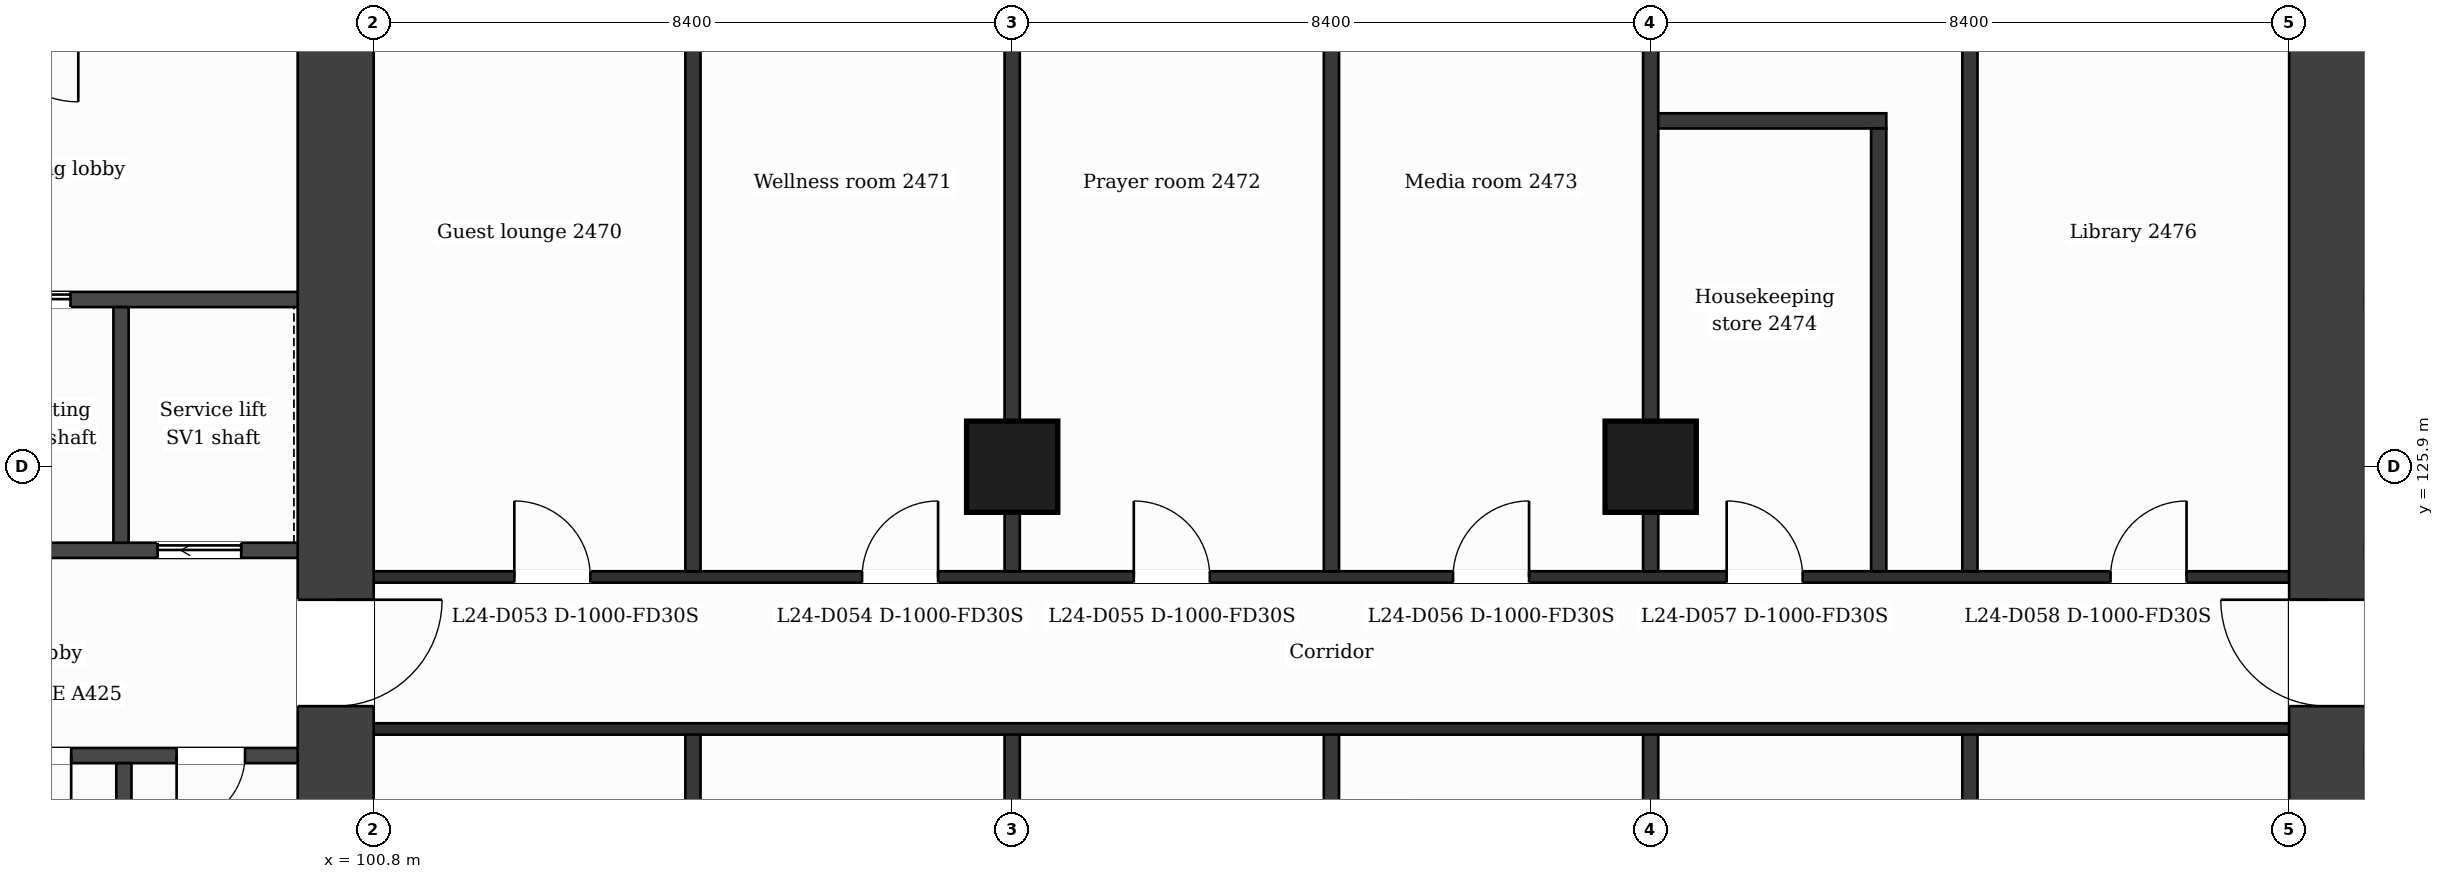
"""IFC4 building model, lengths in metres.
Left out: names, types, materials, properties, quantities, classifications, styles, units other than length and angle.
Written with IfcOpenShell. Run it as: python <this file> out.ifc"""

import sys

from ifc_helpers import new_model, si_unit, direction, frame, frame_2d, origin, origin_2d, place, context, subcontext, project, spatial, rectangle, extrude, element, fill, save


model = new_model("IFC4")
c1 = context("Model", 3, precision=1e-05, world=origin(), true_north=direction((0.0, 1.0)))
c2 = subcontext(c1, "Body", "Model", "MODEL_VIEW")
j1 = project(units=[si_unit("LENGTHUNIT", "METRE"), si_unit("PLANEANGLEUNIT", "RADIAN")], contexts=[c1])
p1 = place(None, origin())
s1 = spatial("IfcSite", under=j1, at=p1, CompositionType="ELEMENT")
p2 = place(p1, origin())
s2 = spatial("IfcBuilding", under=s1, at=p2, CompositionType="ELEMENT")
p3 = place(p2, frame((0.0, 0.0, 105.8)))
s3 = spatial("IfcBuildingStorey", under=s2, at=p3, CompositionType="ELEMENT", Elevation=105.8)
p4 = place(p3, frame((100.3, 131.9, 0.0), z_axis=(0.0, 0.0, 1.0), x_axis=(0.0, -1.0, 0.0)))
e1 = element("IfcWall", 1, at=p4, inside=s3, PredefinedType="SHEAR", context=c2, shape_type="SweptSolid", body=[
    extrude(rectangle(XDim=21.0, YDim=1.0, at=frame_2d((10.5, 0.0))), origin(), (0.0, 0.0, 1.0), 3.7),
])
p5 = place(p4, frame((7.75, 0.0, 0.0)))
e2 = element("IfcOpeningElement", 2, at=p5, cuts=e1, PredefinedType="OPENING", context=c2, shape_type="SweptSolid", body=[
    extrude(rectangle(XDim=1.4, YDim=2.1, at=frame_2d((0.7, 1.05))), frame((0.0, 0.51, 0.0), z_axis=(0.0, -1.0, 0.0), x_axis=(1.0, 0.0, 0.0)), (0.0, 0.0, 1.0), 1.02),
])
p6 = place(p3, frame((126.5, 110.9, 0.0), z_axis=(0.0, 0.0, 1.0), x_axis=(0.0, 1.0, 0.0)))
e3 = element("IfcWall", 3, at=p6, inside=s3, PredefinedType="SHEAR", context=c2, shape_type="SweptSolid", body=[
    extrude(rectangle(XDim=21.0, YDim=1.0, at=frame_2d((10.5, 0.0))), origin(), (0.0, 0.0, 1.0), 3.7),
])
p7 = place(p6, frame((11.85, 0.0, 0.0)))
e4 = element("IfcOpeningElement", 4, at=p7, cuts=e3, PredefinedType="OPENING", context=c2, shape_type="SweptSolid", body=[
    extrude(rectangle(XDim=1.4, YDim=2.1, at=frame_2d((0.7, 1.05))), frame((0.0, 0.51, 0.0), z_axis=(0.0, -1.0, 0.0), x_axis=(1.0, 0.0, 0.0)), (0.0, 0.0, 1.0), 1.02),
])
for number, where, z_axis, x_axis in (
    (5, (109.2, 125.9, 0.0), (0.0, 0.0, 1.0), (1.0, 0.0, 0.0)),
    (6, (117.6, 125.9, 0.0), (0.0, 0.0, 1.0), (1.0, 0.0, 0.0)),
):
    element("IfcColumn", number, at=place(p3, frame(where, z_axis=z_axis, x_axis=x_axis)), inside=s3, PredefinedType="COLUMN", context=c2, shape_type="SweptSolid", body=[
        extrude(rectangle(XDim=1.2, YDim=1.2, at=origin_2d()), origin(), (0.0, 0.0, 1.0), 3.7),
    ])
p8 = place(p3, frame((95.227, 122.1, 0.0), z_axis=(0.0, 0.0, 1.0), x_axis=(1.0, 0.0, 0.0)))
e7 = element("IfcWall", 7, at=p8, inside=s3, PredefinedType="PARTITIONING", context=c2, shape_type="SweptSolid", body=[
    extrude(rectangle(XDim=4.573, YDim=0.2, at=frame_2d((2.287, 0.0))), origin(), (0.0, 0.0, 1.0), 3.38),
])
p9 = place(p8, frame((0.693, 0.0, 0.0)))
e8 = element("IfcOpeningElement", 8, at=p9, cuts=e7, PredefinedType="OPENING", context=c2, shape_type="SweptSolid", body=[
    extrude(rectangle(XDim=0.9, YDim=2.1, at=frame_2d((0.45, 1.05))), frame((0.0, 0.11, 0.0), z_axis=(0.0, -1.0, 0.0), x_axis=(1.0, 0.0, 0.0)), (0.0, 0.0, 1.0), 0.22),
])
p10 = place(p8, frame((2.98, 0.0, 0.0)))
e9 = element("IfcOpeningElement", 9, at=p10, cuts=e7, PredefinedType="OPENING", context=c2, shape_type="SweptSolid", body=[
    extrude(rectangle(XDim=0.9, YDim=2.1, at=frame_2d((0.45, 1.05))), frame((0.0, 0.11, 0.0), z_axis=(0.0, -1.0, 0.0), x_axis=(1.0, 0.0, 0.0)), (0.0, 0.0, 1.0), 0.22),
])
p11 = place(p3, frame((100.8, 122.45, 0.0), z_axis=(0.0, 0.0, 1.0), x_axis=(1.0, 0.0, 0.0)))
e10 = element("IfcWall", 10, at=p11, inside=s3, PredefinedType="PARTITIONING", context=c2, shape_type="SweptSolid", body=[
    extrude(rectangle(XDim=25.2, YDim=0.15, at=frame_2d((12.6, 0.0))), origin(), (0.0, 0.0, 1.0), 3.38),
])
p12 = place(p3, frame((100.8, 124.45, 0.0), z_axis=(0.0, 0.0, 1.0), x_axis=(1.0, 0.0, 0.0)))
e11 = element("IfcWall", 11, at=p12, inside=s3, PredefinedType="PARTITIONING", context=c2, shape_type="SweptSolid", body=[
    extrude(rectangle(XDim=25.2, YDim=0.15, at=frame_2d((12.6, 0.0))), origin(), (0.0, 0.0, 1.0), 3.38),
])
p13 = place(p12, frame((1.85, 0.0, 0.0)))
e12 = element("IfcOpeningElement", 12, at=p13, cuts=e11, PredefinedType="OPENING", context=c2, shape_type="SweptSolid", body=[
    extrude(rectangle(XDim=1.0, YDim=2.1, at=frame_2d((0.5, 1.05))), frame((0.0, 0.085, 0.0), z_axis=(0.0, -1.0, 0.0), x_axis=(1.0, 0.0, 0.0)), (0.0, 0.0, 1.0), 0.17),
])
p14 = place(p12, frame((6.425, 0.0, 0.0)))
e13 = element("IfcOpeningElement", 13, at=p14, cuts=e11, PredefinedType="OPENING", context=c2, shape_type="SweptSolid", body=[
    extrude(rectangle(XDim=1.0, YDim=2.1, at=frame_2d((0.5, 1.05))), frame((0.0, 0.085, 0.0), z_axis=(0.0, -1.0, 0.0), x_axis=(1.0, 0.0, 0.0)), (0.0, 0.0, 1.0), 0.17),
])
p15 = place(p12, frame((10.0, 0.0, 0.0)))
e14 = element("IfcOpeningElement", 14, at=p15, cuts=e11, PredefinedType="OPENING", context=c2, shape_type="SweptSolid", body=[
    extrude(rectangle(XDim=1.0, YDim=2.1, at=frame_2d((0.5, 1.05))), frame((0.0, 0.085, 0.0), z_axis=(0.0, -1.0, 0.0), x_axis=(1.0, 0.0, 0.0)), (0.0, 0.0, 1.0), 0.17),
])
p16 = place(p12, frame((14.2, 0.0, 0.0)))
e15 = element("IfcOpeningElement", 15, at=p16, cuts=e11, PredefinedType="OPENING", context=c2, shape_type="SweptSolid", body=[
    extrude(rectangle(XDim=1.0, YDim=2.1, at=frame_2d((0.5, 1.05))), frame((0.0, 0.085, 0.0), z_axis=(0.0, -1.0, 0.0), x_axis=(1.0, 0.0, 0.0)), (0.0, 0.0, 1.0), 0.17),
])
p17 = place(p12, frame((17.8, 0.0, 0.0)))
e16 = element("IfcOpeningElement", 16, at=p17, cuts=e11, PredefinedType="OPENING", context=c2, shape_type="SweptSolid", body=[
    extrude(rectangle(XDim=1.0, YDim=2.1, at=frame_2d((0.5, 1.05))), frame((0.0, 0.085, 0.0), z_axis=(0.0, -1.0, 0.0), x_axis=(1.0, 0.0, 0.0)), (0.0, 0.0, 1.0), 0.17),
])
p18 = place(p12, frame((22.85, 0.0, 0.0)))
e17 = element("IfcOpeningElement", 17, at=p18, cuts=e11, PredefinedType="OPENING", context=c2, shape_type="SweptSolid", body=[
    extrude(rectangle(XDim=1.0, YDim=2.1, at=frame_2d((0.5, 1.05))), frame((0.0, 0.085, 0.0), z_axis=(0.0, -1.0, 0.0), x_axis=(1.0, 0.0, 0.0)), (0.0, 0.0, 1.0), 0.17),
])
p19 = place(p3, frame((92.702, 124.8, 0.0), z_axis=(0.0, 0.0, 1.0), x_axis=(1.0, 0.0, 0.0)))
e18 = element("IfcWall", 18, at=p19, inside=s3, PredefinedType="PARTITIONING", context=c2, shape_type="SweptSolid", body=[
    extrude(rectangle(XDim=7.098, YDim=0.2, at=frame_2d((3.549, 0.0))), origin(), (0.0, 0.0, 1.0), 3.38),
])
p20 = place(p19, frame((5.255, 0.0, 0.0)))
e19 = element("IfcOpeningElement", 19, at=p20, cuts=e18, PredefinedType="OPENING", context=c2, shape_type="SweptSolid", body=[
    extrude(rectangle(XDim=1.1, YDim=2.1, at=frame_2d((0.55, 1.05))), frame((0.0, 0.11, 0.0), z_axis=(0.0, -1.0, 0.0), x_axis=(1.0, 0.0, 0.0)), (0.0, 0.0, 1.0), 0.22),
])
p21 = place(p3, frame((127.0, 124.8, 0.0), z_axis=(0.0, 0.0, 1.0), x_axis=(1.0, 0.0, 0.0)))
e20 = element("IfcWall", 20, at=p21, inside=s3, PredefinedType="PARTITIONING", context=c2, shape_type="SweptSolid", body=[
    extrude(rectangle(XDim=4.649, YDim=0.2, at=frame_2d((2.324, 0.0))), origin(), (0.0, 0.0, 1.0), 3.38),
])
p22 = place(p21, frame((0.743, 0.0, 0.0)))
e21 = element("IfcOpeningElement", 21, at=p22, cuts=e20, PredefinedType="OPENING", context=c2, shape_type="SweptSolid", body=[
    extrude(rectangle(XDim=1.1, YDim=2.1, at=frame_2d((0.55, 1.05))), frame((0.0, 0.11, 0.0), z_axis=(0.0, -1.0, 0.0), x_axis=(1.0, 0.0, 0.0)), (0.0, 0.0, 1.0), 0.22),
])
p23 = place(p3, frame((92.827, 128.1, 0.0), z_axis=(0.0, 0.0, 1.0), x_axis=(1.0, 0.0, 0.0)))
e22 = element("IfcWall", 22, at=p23, inside=s3, PredefinedType="PARTITIONING", context=c2, shape_type="SweptSolid", body=[
    extrude(rectangle(XDim=6.973, YDim=0.2, at=frame_2d((3.487, 0.0))), origin(), (0.0, 0.0, 1.0), 3.38),
])
p24 = place(p23, frame((2.884, 0.0, 0.0)))
e23 = element("IfcOpeningElement", 23, at=p24, cuts=e22, PredefinedType="OPENING", context=c2, shape_type="SweptSolid", body=[
    extrude(rectangle(XDim=1.1, YDim=2.1, at=frame_2d((0.55, 1.05))), frame((0.0, 0.11, 0.0), z_axis=(0.0, -1.0, 0.0), x_axis=(1.0, 0.0, 0.0)), (0.0, 0.0, 1.0), 0.22),
])
p25 = place(p3, frame((127.0, 128.1, 0.0), z_axis=(0.0, 0.0, 1.0), x_axis=(1.0, 0.0, 0.0)))
e24 = element("IfcWall", 24, at=p25, inside=s3, PredefinedType="PARTITIONING", context=c2, shape_type="SweptSolid", body=[
    extrude(rectangle(XDim=4.649, YDim=0.2, at=frame_2d((2.324, 0.0))), origin(), (0.0, 0.0, 1.0), 3.38),
])
p26 = place(p25, frame((2.805, 0.0, 0.0)))
e25 = element("IfcOpeningElement", 25, at=p26, cuts=e24, PredefinedType="OPENING", context=c2, shape_type="SweptSolid", body=[
    extrude(rectangle(XDim=1.1, YDim=2.1, at=frame_2d((0.55, 1.05))), frame((0.0, 0.11, 0.0), z_axis=(0.0, -1.0, 0.0), x_axis=(1.0, 0.0, 0.0)), (0.0, 0.0, 1.0), 0.22),
])
p27 = place(p3, frame((117.6, 130.45, 0.0), z_axis=(0.0, 0.0, 1.0), x_axis=(1.0, 0.0, 0.0)))
e26 = element("IfcWall", 26, at=p27, inside=s3, PredefinedType="PARTITIONING", context=c2, shape_type="SweptSolid", body=[
    extrude(rectangle(XDim=3.1, YDim=0.2, at=frame_2d((1.55, 0.0))), origin(), (0.0, 0.0, 1.0), 3.38),
])
for number, where, z_axis, x_axis in (
    (27, (97.476, 124.9, 0.0), (0.0, 0.0, 1.0), (0.0, 1.0, 0.0)),
    (28, (97.513, 118.9, 0.0), (0.0, 0.0, 1.0), (0.0, 1.0, 0.0)),
):
    element("IfcWall", number, at=place(p3, frame(where, z_axis=z_axis, x_axis=x_axis)), inside=s3, PredefinedType="PARTITIONING", context=c2, shape_type="SweptSolid", body=[
        extrude(rectangle(XDim=3.1, YDim=0.2, at=frame_2d((1.55, 0.0))), origin(), (0.0, 0.0, 1.0), 3.38),
    ])
p28 = place(p3, frame((105.0, 109.075, 0.0), z_axis=(0.0, 0.0, 1.0), x_axis=(0.0, 1.0, 0.0)))
e29 = element("IfcWall", 29, at=p28, inside=s3, PredefinedType="PARTITIONING", context=c2, shape_type="SweptSolid", body=[
    extrude(rectangle(XDim=13.3, YDim=0.2, at=frame_2d((6.65, 0.0))), origin(), (0.0, 0.0, 1.0), 3.38),
])
p29 = place(p3, frame((105.0, 124.525, 0.0), z_axis=(0.0, 0.0, 1.0), x_axis=(0.0, 1.0, 0.0)))
e30 = element("IfcWall", 30, at=p29, inside=s3, PredefinedType="PARTITIONING", context=c2, shape_type="SweptSolid", body=[
    extrude(rectangle(XDim=9.2, YDim=0.2, at=frame_2d((4.6, 0.0))), origin(), (0.0, 0.0, 1.0), 3.38),
])
p30 = place(p3, frame((109.2, 109.075, 0.0), z_axis=(0.0, 0.0, 1.0), x_axis=(0.0, 1.0, 0.0)))
e31 = element("IfcWall", 31, at=p30, inside=s3, PredefinedType="PARTITIONING", context=c2, shape_type="SweptSolid", body=[
    extrude(rectangle(XDim=13.3, YDim=0.2, at=frame_2d((6.65, 0.0))), origin(), (0.0, 0.0, 1.0), 3.38),
])
p31 = place(p3, frame((109.2, 124.525, 0.0), z_axis=(0.0, 0.0, 1.0), x_axis=(0.0, 1.0, 0.0)))
e32 = element("IfcWall", 32, at=p31, inside=s3, PredefinedType="PARTITIONING", context=c2, shape_type="SweptSolid", body=[
    extrude(rectangle(XDim=9.2, YDim=0.2, at=frame_2d((4.6, 0.0))), origin(), (0.0, 0.0, 1.0), 3.38),
])
p32 = place(p3, frame((113.4, 109.075, 0.0), z_axis=(0.0, 0.0, 1.0), x_axis=(0.0, 1.0, 0.0)))
e33 = element("IfcWall", 33, at=p32, inside=s3, PredefinedType="PARTITIONING", context=c2, shape_type="SweptSolid", body=[
    extrude(rectangle(XDim=13.3, YDim=0.2, at=frame_2d((6.65, 0.0))), origin(), (0.0, 0.0, 1.0), 3.38),
])
p33 = place(p3, frame((113.4, 124.525, 0.0), z_axis=(0.0, 0.0, 1.0), x_axis=(0.0, 1.0, 0.0)))
e34 = element("IfcWall", 34, at=p33, inside=s3, PredefinedType="PARTITIONING", context=c2, shape_type="SweptSolid", body=[
    extrude(rectangle(XDim=9.2, YDim=0.2, at=frame_2d((4.6, 0.0))), origin(), (0.0, 0.0, 1.0), 3.38),
])
p34 = place(p3, frame((117.6, 109.075, 0.0), z_axis=(0.0, 0.0, 1.0), x_axis=(0.0, 1.0, 0.0)))
e35 = element("IfcWall", 35, at=p34, inside=s3, PredefinedType="PARTITIONING", context=c2, shape_type="SweptSolid", body=[
    extrude(rectangle(XDim=13.3, YDim=0.2, at=frame_2d((6.65, 0.0))), origin(), (0.0, 0.0, 1.0), 3.38),
])
p35 = place(p3, frame((117.6, 124.525, 0.0), z_axis=(0.0, 0.0, 1.0), x_axis=(0.0, 1.0, 0.0)))
e36 = element("IfcWall", 36, at=p35, inside=s3, PredefinedType="PARTITIONING", context=c2, shape_type="SweptSolid", body=[
    extrude(rectangle(XDim=9.2, YDim=0.2, at=frame_2d((4.6, 0.0))), origin(), (0.0, 0.0, 1.0), 3.38),
])
p36 = place(p3, frame((120.6, 124.525, 0.0), z_axis=(0.0, 0.0, 1.0), x_axis=(0.0, 1.0, 0.0)))
e37 = element("IfcWall", 37, at=p36, inside=s3, PredefinedType="PARTITIONING", context=c2, shape_type="SweptSolid", body=[
    extrude(rectangle(XDim=5.825, YDim=0.2, at=frame_2d((2.913, 0.0))), origin(), (0.0, 0.0, 1.0), 3.38),
])
p37 = place(p3, frame((121.8, 109.075, 0.0), z_axis=(0.0, 0.0, 1.0), x_axis=(0.0, 1.0, 0.0)))
e38 = element("IfcWall", 38, at=p37, inside=s3, PredefinedType="PARTITIONING", context=c2, shape_type="SweptSolid", body=[
    extrude(rectangle(XDim=13.3, YDim=0.2, at=frame_2d((6.65, 0.0))), origin(), (0.0, 0.0, 1.0), 3.38),
])
p38 = place(p3, frame((121.8, 124.525, 0.0), z_axis=(0.0, 0.0, 1.0), x_axis=(0.0, 1.0, 0.0)))
e39 = element("IfcWall", 39, at=p38, inside=s3, PredefinedType="PARTITIONING", context=c2, shape_type="SweptSolid", body=[
    extrude(rectangle(XDim=9.2, YDim=0.2, at=frame_2d((4.6, 0.0))), origin(), (0.0, 0.0, 1.0), 3.38),
])
p39 = place(p24, origin())
e40 = element("IfcDoor", 40, at=p39, inside=s3, OperationType="SLIDING_TO_LEFT", PredefinedType="DOOR", context=c2, shape_type="SweptSolid", body=[
    extrude(rectangle(XDim=1.1, YDim=2.1, at=frame_2d((0.55, 1.05))), frame((0.0, 0.025, 0.0), z_axis=(0.0, -1.0, 0.0), x_axis=(1.0, 0.0, 0.0)), (0.0, 0.0, 1.0), 0.05),
])
fill(e23, e40)
p40 = place(p20, origin())
e41 = element("IfcDoor", 41, at=p40, inside=s3, OperationType="SLIDING_TO_LEFT", PredefinedType="DOOR", context=c2, shape_type="SweptSolid", body=[
    extrude(rectangle(XDim=1.1, YDim=2.1, at=frame_2d((0.55, 1.05))), frame((0.0, 0.025, 0.0), z_axis=(0.0, -1.0, 0.0), x_axis=(1.0, 0.0, 0.0)), (0.0, 0.0, 1.0), 0.05),
])
fill(e19, e41)
p41 = place(p9, origin())
e42 = element("IfcDoor", 42, at=p41, inside=s3, OperationType="SINGLE_SWING_RIGHT", PredefinedType="DOOR", context=c2, shape_type="SweptSolid", body=[
    extrude(rectangle(XDim=0.9, YDim=2.1, at=frame_2d((0.45, 1.05))), frame((0.0, 0.025, 0.0), z_axis=(0.0, -1.0, 0.0), x_axis=(1.0, 0.0, 0.0)), (0.0, 0.0, 1.0), 0.05),
])
fill(e8, e42)
p42 = place(p10, origin())
e43 = element("IfcDoor", 43, at=p42, inside=s3, OperationType="SINGLE_SWING_LEFT", PredefinedType="DOOR", context=c2, shape_type="SweptSolid", body=[
    extrude(rectangle(XDim=0.9, YDim=2.1, at=frame_2d((0.45, 1.05))), frame((0.0, 0.025, 0.0), z_axis=(0.0, -1.0, 0.0), x_axis=(1.0, 0.0, 0.0)), (0.0, 0.0, 1.0), 0.05),
])
fill(e9, e43)
p43 = place(p13, origin())
e44 = element("IfcDoor", 44, at=p43, inside=s3, OperationType="SINGLE_SWING_LEFT", PredefinedType="DOOR", context=c2, shape_type="SweptSolid", body=[
    extrude(rectangle(XDim=1.0, YDim=2.1, at=frame_2d((0.5, 1.05))), frame((0.0, 0.025, 0.0), z_axis=(0.0, -1.0, 0.0), x_axis=(1.0, 0.0, 0.0)), (0.0, 0.0, 1.0), 0.05),
])
fill(e12, e44)
p44 = place(p14, origin())
e45 = element("IfcDoor", 45, at=p44, inside=s3, OperationType="SINGLE_SWING_RIGHT", PredefinedType="DOOR", context=c2, shape_type="SweptSolid", body=[
    extrude(rectangle(XDim=1.0, YDim=2.1, at=frame_2d((0.5, 1.05))), frame((0.0, 0.025, 0.0), z_axis=(0.0, -1.0, 0.0), x_axis=(1.0, 0.0, 0.0)), (0.0, 0.0, 1.0), 0.05),
])
fill(e13, e45)
p45 = place(p15, origin())
e46 = element("IfcDoor", 46, at=p45, inside=s3, OperationType="SINGLE_SWING_LEFT", PredefinedType="DOOR", context=c2, shape_type="SweptSolid", body=[
    extrude(rectangle(XDim=1.0, YDim=2.1, at=frame_2d((0.5, 1.05))), frame((0.0, 0.025, 0.0), z_axis=(0.0, -1.0, 0.0), x_axis=(1.0, 0.0, 0.0)), (0.0, 0.0, 1.0), 0.05),
])
fill(e14, e46)
p46 = place(p16, origin())
e47 = element("IfcDoor", 47, at=p46, inside=s3, OperationType="SINGLE_SWING_RIGHT", PredefinedType="DOOR", context=c2, shape_type="SweptSolid", body=[
    extrude(rectangle(XDim=1.0, YDim=2.1, at=frame_2d((0.5, 1.05))), frame((0.0, 0.025, 0.0), z_axis=(0.0, -1.0, 0.0), x_axis=(1.0, 0.0, 0.0)), (0.0, 0.0, 1.0), 0.05),
])
fill(e15, e47)
p47 = place(p17, origin())
e48 = element("IfcDoor", 48, at=p47, inside=s3, OperationType="SINGLE_SWING_LEFT", PredefinedType="DOOR", context=c2, shape_type="SweptSolid", body=[
    extrude(rectangle(XDim=1.0, YDim=2.1, at=frame_2d((0.5, 1.05))), frame((0.0, 0.025, 0.0), z_axis=(0.0, -1.0, 0.0), x_axis=(1.0, 0.0, 0.0)), (0.0, 0.0, 1.0), 0.05),
])
fill(e16, e48)
p48 = place(p18, origin())
e49 = element("IfcDoor", 49, at=p48, inside=s3, OperationType="SINGLE_SWING_RIGHT", PredefinedType="DOOR", context=c2, shape_type="SweptSolid", body=[
    extrude(rectangle(XDim=1.0, YDim=2.1, at=frame_2d((0.5, 1.05))), frame((0.0, 0.025, 0.0), z_axis=(0.0, -1.0, 0.0), x_axis=(1.0, 0.0, 0.0)), (0.0, 0.0, 1.0), 0.05),
])
fill(e17, e49)
p49 = place(p5, origin())
e50 = element("IfcDoor", 50, at=p49, inside=s3, OperationType="SINGLE_SWING_LEFT", PredefinedType="DOOR", context=c2, shape_type="SweptSolid", body=[
    extrude(rectangle(XDim=1.4, YDim=2.1, at=frame_2d((0.7, 1.05))), frame((0.0, 0.025, 0.0), z_axis=(0.0, -1.0, 0.0), x_axis=(1.0, 0.0, 0.0)), (0.0, 0.0, 1.0), 0.05),
])
fill(e2, e50)
p50 = place(p7, origin())
e51 = element("IfcDoor", 51, at=p50, inside=s3, OperationType="SINGLE_SWING_RIGHT", PredefinedType="DOOR", context=c2, shape_type="SweptSolid", body=[
    extrude(rectangle(XDim=1.4, YDim=2.1, at=frame_2d((0.7, 1.05))), frame((0.0, 0.025, 0.0), z_axis=(0.0, -1.0, 0.0), x_axis=(1.0, 0.0, 0.0)), (0.0, 0.0, 1.0), 0.05),
])
fill(e4, e51)
save(model, sys.argv[1])
